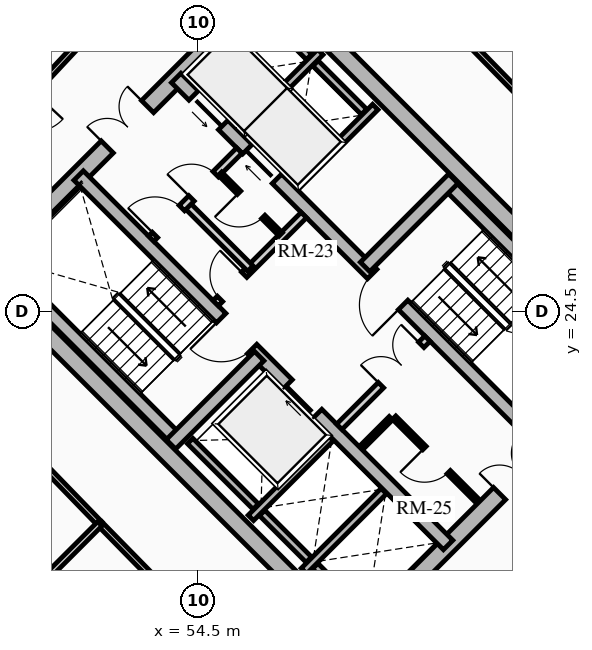
"""IFC4 building model, lengths in metres.
Left out: names, types, materials, properties, quantities, classifications, styles, units other than length and angle.
Written with IfcOpenShell. Run it as: python <this file> out.ifc"""

import sys

from ifc_helpers import new_model, si_unit, direction, frame, frame_2d, origin, place, context, subcontext, project, spatial, rectangle, extrude, source, transform, mapped, element, fill, save


model = new_model("IFC4")
c1 = context("Model", 3, precision=1e-05, world=origin(), true_north=direction((0.0, 1.0)))
c2 = subcontext(c1, "Body", "Model", "MODEL_VIEW")
j1 = project(units=[si_unit("LENGTHUNIT", "METRE"), si_unit("PLANEANGLEUNIT", "RADIAN")], contexts=[c1])
p1 = place(None, origin())
s1 = spatial("IfcSite", under=j1, at=p1, CompositionType="ELEMENT")
p2 = place(p1, origin())
s2 = spatial("IfcBuilding", under=s1, at=p2, CompositionType="ELEMENT")
p3 = place(p2, frame((0.0, 0.0, 84.7)))
s3 = spatial("IfcBuildingStorey", under=s2, at=p3, CompositionType="ELEMENT", Elevation=84.7)
for number, where, z_axis, x_axis in (
    (1, (58.737, 15.697, 0.0), (0.0, 0.0, 1.0), (-0.707, 0.707, 0.0)),
    (2, (66.303, 23.263, 0.0), (0.0, 0.0, 1.0), (-0.707, 0.707, 0.0)),
):
    element("IfcWall", number, at=place(p3, frame(where, z_axis=z_axis, x_axis=x_axis)), inside=s3, PredefinedType="SHEAR", context=c2, shape_type="SweptSolid", body=[
        extrude(rectangle(XDim=14.2, YDim=0.45, at=frame_2d((7.1, 0.0))), origin(), (0.0, 0.0, 1.0), 2.91),
    ])
p4 = place(p3, frame((58.578, 15.856, 0.0), z_axis=(0.0, 0.0, 1.0), x_axis=(0.707106781187, 0.707106781187, 0.0)))
e3 = element("IfcWall", 3, at=p4, inside=s3, PredefinedType="SHEAR", context=c2, shape_type="SweptSolid", body=[
    extrude(rectangle(XDim=10.7, YDim=0.45, at=frame_2d((5.35, 0.0))), origin(), (0.0, 0.0, 1.0), 2.91),
])
m1 = source(origin(), c2, "Body", "SweptSolid", [
    extrude(rectangle(XDim=1.5, YDim=2.02, at=frame_2d((0.75, 1.01))), frame((0.0, 0.235, 0.0), z_axis=(0.0, -1.0, 0.0), x_axis=(1.0, 0.0, 0.0)), (0.0, 0.0, 1.0), 0.47),
])
p5 = place(p4, frame((5.45, 0.0, 0.0)))
e4 = element("IfcOpeningElement", 4, at=p5, cuts=e3, PredefinedType="OPENING", context=c2, shape_type="MappedRepresentation", body=[
    mapped(m1, transform((0.0, 0.0, 0.0), x_axis=(1.0, 0.0, 0.0), y_axis=(0.0, 1.0, 0.0), z_axis=(0.0, 0.0, 1.0), scale=1.0)),
])
p6 = place(p3, frame((48.856, 25.578, 0.0), z_axis=(0.0, 0.0, 1.0), x_axis=(0.707106781187, 0.707106781187, 0.0)))
e5 = element("IfcWall", 5, at=p6, inside=s3, PredefinedType="SHEAR", context=c2, shape_type="SweptSolid", body=[
    extrude(rectangle(XDim=10.7, YDim=0.45, at=frame_2d((5.35, 0.0))), origin(), (0.0, 0.0, 1.0), 2.91),
])
p7 = place(p6, frame((4.6, 0.0, 0.0)))
e6 = element("IfcOpeningElement", 6, at=p7, cuts=e5, PredefinedType="OPENING", context=c2, shape_type="MappedRepresentation", body=[
    mapped(m1, transform((0.0, 0.0, 0.0), x_axis=(1.0, 0.0, 0.0), y_axis=(0.0, 1.0, 0.0), z_axis=(0.0, 0.0, 1.0), scale=1.0)),
])
p8 = place(p3, frame((61.078, 18.355, 0.0), z_axis=(0.0, 0.0, 1.0), x_axis=(-0.707106781187, 0.707106781187, 0.0)))
e7 = element("IfcWall", 7, at=p8, inside=s3, PredefinedType="SHEAR", context=c2, shape_type="SweptSolid", body=[
    extrude(rectangle(XDim=13.75, YDim=0.35, at=frame_2d((6.875, 0.0))), origin(), (0.0, 0.0, 1.0), 2.91),
])
m2 = source(origin(), c2, "Body", "SweptSolid", [
    extrude(rectangle(XDim=1.1, YDim=2.015, at=frame_2d((0.55, 1.007))), frame((0.0, 0.185, 0.0), z_axis=(0.0, -1.0, 0.0), x_axis=(1.0, 0.0, 0.0)), (0.0, 0.0, 1.0), 0.37),
])
p9 = place(p8, frame((4.875, 0.0, 0.0)))
e8 = element("IfcOpeningElement", 8, at=p9, cuts=e7, PredefinedType="OPENING", context=c2, shape_type="MappedRepresentation", body=[
    mapped(m2, transform((0.0, 0.0, 0.0), x_axis=(1.0, 0.0, 0.0), y_axis=(0.0, 1.0, 0.0), z_axis=(0.0, 0.0, 1.0), scale=1.0)),
])
m3 = source(origin(), c2, "Body", "SweptSolid", [
    extrude(rectangle(XDim=1.15, YDim=2.02, at=frame_2d((0.575, 1.01))), frame((0.0, 0.185, 0.0), z_axis=(0.0, -1.0, 0.0), x_axis=(1.0, 0.0, 0.0)), (0.0, 0.0, 1.0), 0.37),
])
p10 = place(p8, frame((7.295, 0.0, 0.0)))
e9 = element("IfcOpeningElement", 9, at=p10, cuts=e7, PredefinedType="OPENING", context=c2, shape_type="MappedRepresentation", body=[
    mapped(m3, transform((0.0, 0.0, 0.0), x_axis=(1.0, 0.0, 0.0), y_axis=(0.0, 1.0, 0.0), z_axis=(0.0, 0.0, 1.0), scale=1.0)),
])
p11 = place(p3, frame((63.645, 20.922, 0.0), z_axis=(0.0, 0.0, 1.0), x_axis=(-0.707106781187, 0.707106781187, 0.0)))
e10 = element("IfcWall", 10, at=p11, inside=s3, PredefinedType="SHEAR", context=c2, shape_type="SweptSolid", body=[
    extrude(rectangle(XDim=13.75, YDim=0.35, at=frame_2d((6.875, 0.0))), origin(), (0.0, 0.0, 1.0), 2.91),
])
p12 = place(p11, frame((10.0, 0.0, 0.0)))
e11 = element("IfcOpeningElement", 11, at=p12, cuts=e10, PredefinedType="OPENING", context=c2, shape_type="MappedRepresentation", body=[
    mapped(m2, transform((0.0, 0.0, 0.0), x_axis=(1.0, 0.0, 0.0), y_axis=(0.0, 1.0, 0.0), z_axis=(0.0, 0.0, 1.0), scale=1.0)),
])
p13 = place(p11, frame((12.0, 0.0, 0.0)))
e12 = element("IfcOpeningElement", 12, at=p13, cuts=e10, PredefinedType="OPENING", context=c2, shape_type="MappedRepresentation", body=[
    mapped(m2, transform((0.0, 0.0, 0.0), x_axis=(1.0, 0.0, 0.0), y_axis=(0.0, 1.0, 0.0), z_axis=(0.0, 0.0, 1.0), scale=1.0)),
])
p14 = place(p11, frame((5.305, 0.0, 0.0)))
e13 = element("IfcOpeningElement", 13, at=p14, cuts=e10, PredefinedType="OPENING", context=c2, shape_type="MappedRepresentation", body=[
    mapped(m3, transform((0.0, 0.0, 0.0), x_axis=(1.0, 0.0, 0.0), y_axis=(0.0, 1.0, 0.0), z_axis=(0.0, 0.0, 1.0), scale=1.0)),
])
p15 = place(p3, frame((53.922, 21.141, 0.0), z_axis=(0.0, 0.0, 1.0), x_axis=(-0.707088616009, 0.707124945897, 0.0)))
e14 = element("IfcWall", 14, at=p15, inside=s3, PredefinedType="SHEAR", context=c2, shape_type="SweptSolid", body=[
    extrude(rectangle(XDim=6.72, YDim=0.35, at=frame_2d((3.36, 0.0))), origin(), (0.0, 0.0, 1.0), 2.91),
])
p16 = place(p3, frame((53.784, 21.003, 0.0), z_axis=(0.0, 0.0, 1.0), x_axis=(0.707106781187, 0.707106781187, 0.0)))
e15 = element("IfcWall", 15, at=p16, inside=s3, PredefinedType="SHEAR", context=c2, shape_type="SweptSolid", body=[
    extrude(rectangle(XDim=3.285, YDim=0.35, at=frame_2d((1.643, 0.0))), origin(), (0.0, 0.0, 1.0), 2.91),
])
p17 = place(p3, frame((65.83, 23.107, 0.0), z_axis=(0.0, 0.0, 1.0), x_axis=(-0.707088616009, 0.707124945897, 0.0)))
e16 = element("IfcWall", 16, at=p17, inside=s3, PredefinedType="SHEAR", context=c2, shape_type="SweptSolid", body=[
    extrude(rectangle(XDim=6.72, YDim=0.35, at=frame_2d((3.36, 0.0))), origin(), (0.0, 0.0, 1.0), 2.91),
])
p18 = place(p3, frame((58.893, 25.674, 0.0), z_axis=(0.0, 0.0, 1.0), x_axis=(0.707106781187, 0.707106781187, 0.0)))
e17 = element("IfcWall", 17, at=p18, inside=s3, PredefinedType="SHEAR", context=c2, shape_type="SweptSolid", body=[
    extrude(rectangle(XDim=3.285, YDim=0.35, at=frame_2d((1.643, 0.0))), origin(), (0.0, 0.0, 1.0), 2.91),
])
p19 = place(p3, frame((55.888, 19.069, 0.0), z_axis=(0.0, 0.0, 1.0), x_axis=(0.707106781187, 0.707106781187, 0.0)))
e18 = element("IfcWall", 18, at=p19, inside=s3, PredefinedType="SHEAR", context=c2, shape_type="SweptSolid", body=[
    extrude(rectangle(XDim=2.97, YDim=0.2, at=frame_2d((1.485, 0.0))), origin(), (0.0, 0.0, 1.0), 2.91),
])
p20 = place(p3, frame((56.015, 19.366, 0.0), z_axis=(0.0, 0.0, 1.0), x_axis=(-0.707106781187, 0.707106781187, 0.0)))
e19 = element("IfcWall", 19, at=p20, inside=s3, PredefinedType="SHEAR", context=c2, shape_type="SweptSolid", body=[
    extrude(rectangle(XDim=2.44, YDim=0.2, at=frame_2d((1.22, 0.0))), origin(), (0.0, 0.0, 1.0), 2.91),
])
p21 = place(p3, frame((57.284, 17.673, 0.0), z_axis=(0.0, 0.0, 1.0), x_axis=(0.707147878904, 0.70706568108, 0.0)))
e20 = element("IfcWall", 20, at=p21, inside=s3, PredefinedType="SHEAR", context=c2, shape_type="SweptSolid", body=[
    extrude(rectangle(XDim=2.97, YDim=0.2, at=frame_2d((1.485, 0.0))), origin(), (0.0, 0.0, 1.0), 2.91),
])
p22 = place(p3, frame((57.412, 17.97, 0.0), z_axis=(0.0, 0.0, 1.0), x_axis=(-0.707106781187, 0.707106781187, 0.0)))
e21 = element("IfcWall", 21, at=p22, inside=s3, PredefinedType="SHEAR", context=c2, shape_type="SweptSolid", body=[
    extrude(rectangle(XDim=1.735, YDim=0.2, at=frame_2d((0.867, 0.0))), origin(), (0.0, 0.0, 1.0), 2.91),
])
p23 = place(p3, frame((58.737, 16.644, 0.0), z_axis=(0.0, 0.0, 1.0), x_axis=(-0.707032117043, 0.707181437447, 0.0)))
e22 = element("IfcWall", 22, at=p23, inside=s3, PredefinedType="SHEAR", context=c2, shape_type="SweptSolid", body=[
    extrude(rectangle(XDim=1.635, YDim=0.2, at=frame_2d((0.817, 0.0))), origin(), (0.0, 0.0, 1.0), 2.91),
])
p24 = place(p3, frame((57.062, 27.781, 0.0), z_axis=(0.0, 0.0, 1.0), x_axis=(0.707106781187, 0.707106781187, 0.0)))
e23 = element("IfcWall", 23, at=p24, inside=s3, PredefinedType="SHEAR", context=c2, shape_type="SweptSolid", body=[
    extrude(rectangle(XDim=2.97, YDim=0.2, at=frame_2d((1.485, 0.0))), origin(), (0.0, 0.0, 1.0), 2.91),
])
p25 = place(p3, frame((55.615, 29.227, 0.0), z_axis=(0.0, 0.0, 1.0), x_axis=(0.707147878904, 0.70706568108, 0.0)))
e24 = element("IfcWall", 24, at=p25, inside=s3, PredefinedType="SHEAR", context=c2, shape_type="SweptSolid", body=[
    extrude(rectangle(XDim=2.97, YDim=0.2, at=frame_2d((1.485, 0.0))), origin(), (0.0, 0.0, 1.0), 2.91),
])
p26 = place(p3, frame((58.865, 29.754, 0.0), z_axis=(0.0, 0.0, 1.0), x_axis=(-0.707174411312, 0.707039144592, 0.0)))
e25 = element("IfcWall", 25, at=p26, inside=s3, PredefinedType="SHEAR", context=c2, shape_type="SweptSolid", body=[
    extrude(rectangle(XDim=1.805, YDim=0.2, at=frame_2d((0.902, 0.0))), origin(), (0.0, 0.0, 1.0), 2.91),
])
p27 = place(p3, frame((57.419, 31.2, 0.0), z_axis=(0.0, 0.0, 1.0), x_axis=(-0.707032117043, 0.707181437447, 0.0)))
e26 = element("IfcWall", 26, at=p27, inside=s3, PredefinedType="SHEAR", context=c2, shape_type="SweptSolid", body=[
    extrude(rectangle(XDim=1.635, YDim=0.2, at=frame_2d((0.817, 0.0))), origin(), (0.0, 0.0, 1.0), 2.91),
])
p28 = place(p3, frame((58.214, 21.467, 0.0), z_axis=(0.0, 0.0, 1.0), x_axis=(0.707106781187, 0.707106781187, 0.0)))
e27 = element("IfcWall", 27, at=p28, inside=s3, PredefinedType="PARTITIONING", context=c2, shape_type="SweptSolid", body=[
    extrude(rectangle(XDim=3.28, YDim=0.2, at=frame_2d((1.64, 0.0))), origin(), (0.0, 0.0, 1.0), 2.655),
])
m4 = source(origin(), c2, "Body", "SweptSolid", [
    extrude(rectangle(XDim=1.5, YDim=2.02, at=frame_2d((0.75, 1.01))), frame((0.0, 0.11, 0.0), z_axis=(0.0, -1.0, 0.0), x_axis=(1.0, 0.0, 0.0)), (0.0, 0.0, 1.0), 0.22),
])
p29 = place(p28, frame((1.55, 0.0, 0.0)))
e28 = element("IfcOpeningElement", 28, at=p29, cuts=e27, PredefinedType="OPENING", context=c2, shape_type="MappedRepresentation", body=[
    mapped(m4, transform((0.0, 0.0, 0.0), x_axis=(1.0, 0.0, 0.0), y_axis=(0.0, 1.0, 0.0), z_axis=(0.0, 0.0, 1.0), scale=1.0)),
])
p30 = place(p3, frame((54.961, 24.719, 0.0), z_axis=(0.0, 0.0, 1.0), x_axis=(0.707106781187, 0.707106781187, 0.0)))
e29 = element("IfcWall", 29, at=p30, inside=s3, PredefinedType="PARTITIONING", context=c2, shape_type="SweptSolid", body=[
    extrude(rectangle(XDim=3.28, YDim=0.2, at=frame_2d((1.64, 0.0))), origin(), (0.0, 0.0, 1.0), 2.655),
])
m5 = source(origin(), c2, "Body", "SweptSolid", [
    extrude(rectangle(XDim=0.9, YDim=2.005, at=frame_2d((0.45, 1.002))), frame((0.0, 0.11, 0.0), z_axis=(0.0, -1.0, 0.0), x_axis=(1.0, 0.0, 0.0)), (0.0, 0.0, 1.0), 0.22),
])
p31 = place(p30, frame((0.16, 0.0, 0.0)))
e30 = element("IfcOpeningElement", 30, at=p31, cuts=e29, PredefinedType="OPENING", context=c2, shape_type="MappedRepresentation", body=[
    mapped(m5, transform((0.0, 0.0, 0.0), x_axis=(1.0, 0.0, 0.0), y_axis=(0.0, 1.0, 0.0), z_axis=(0.0, 0.0, 1.0), scale=1.0)),
])
p32 = place(p3, frame((55.874, 25.631, 0.0), z_axis=(0.0, 0.0, 1.0), x_axis=(-0.707157639372, 0.707055919343, 0.0)))
e31 = element("IfcWall", 31, at=p32, inside=s3, PredefinedType="PARTITIONING", context=c2, shape_type="SweptSolid", body=[
    extrude(rectangle(XDim=2.4, YDim=0.2, at=frame_2d((1.2, 0.0))), origin(), (0.0, 0.0, 1.0), 2.655),
])
p33 = place(p3, frame((53.264, 26.416, 0.0), z_axis=(0.0, 0.0, 1.0), x_axis=(0.707106781187, 0.707106781187, 0.0)))
e32 = element("IfcWall", 32, at=p33, inside=s3, PredefinedType="PARTITIONING", context=c2, shape_type="SweptSolid", body=[
    extrude(rectangle(XDim=3.28, YDim=0.2, at=frame_2d((1.64, 0.0))), origin(), (0.0, 0.0, 1.0), 2.655),
])
m6 = source(origin(), c2, "Body", "SweptSolid", [
    extrude(rectangle(XDim=1.0, YDim=2.015, at=frame_2d((0.5, 1.007))), frame((0.0, 0.11, 0.0), z_axis=(0.0, -1.0, 0.0), x_axis=(1.0, 0.0, 0.0)), (0.0, 0.0, 1.0), 0.22),
])
p34 = place(p33, frame((0.14, 0.0, 0.0)))
e33 = element("IfcOpeningElement", 33, at=p34, cuts=e32, PredefinedType="OPENING", context=c2, shape_type="MappedRepresentation", body=[
    mapped(m6, transform((0.0, 0.0, 0.0), x_axis=(1.0, 0.0, 0.0), y_axis=(0.0, 1.0, 0.0), z_axis=(0.0, 0.0, 1.0), scale=1.0)),
])
p35 = place(p33, frame((1.5, 0.0, 0.0)))
e34 = element("IfcOpeningElement", 34, at=p35, cuts=e32, PredefinedType="OPENING", context=c2, shape_type="MappedRepresentation", body=[
    mapped(m5, transform((0.0, 0.0, 0.0), x_axis=(1.0, 0.0, 0.0), y_axis=(0.0, 1.0, 0.0), z_axis=(0.0, 0.0, 1.0), scale=1.0)),
])
p36 = place(p3, frame((61.835, 19.529, 0.0), z_axis=(0.0, 0.0, 1.0), x_axis=(-0.707146413884, 0.707067146267, 0.0)))
e35 = element("IfcWall", 35, at=p36, inside=s3, PredefinedType="PARTITIONING", context=c2, shape_type="SweptSolid", body=[
    extrude(rectangle(XDim=3.08, YDim=0.125, at=frame_2d((1.54, 0.0))), origin(), (0.0, 0.0, 1.0), 2.655),
])
m7 = source(origin(), c2, "Body", "SweptSolid", [
    extrude(rectangle(XDim=0.9, YDim=2.005, at=frame_2d((0.45, 1.002))), frame((0.0, 0.073, 0.0), z_axis=(0.0, -1.0, 0.0), x_axis=(1.0, 0.0, 0.0)), (0.0, 0.0, 1.0), 0.145),
])
p37 = place(p36, frame((1.05, 0.0, 0.0)))
e36 = element("IfcOpeningElement", 36, at=p37, cuts=e35, PredefinedType="OPENING", context=c2, shape_type="MappedRepresentation", body=[
    mapped(m7, transform((0.0, 0.0, 0.0), x_axis=(1.0, 0.0, 0.0), y_axis=(0.0, 1.0, 0.0), z_axis=(0.0, 0.0, 1.0), scale=1.0)),
])
p38 = place(p3, frame((58.794, 20.915, 0.0), z_axis=(0.0, 0.0, 1.0), x_axis=(0.707106781187, 0.707106781187, 0.0)))
e37 = element("IfcWall", 37, at=p38, inside=s3, PredefinedType="PARTITIONING", context=c2, shape_type="SweptSolid", body=[
    extrude(rectangle(XDim=1.1, YDim=0.125, at=frame_2d((0.55, 0.0))), origin(), (0.0, 0.0, 1.0), 2.655),
])
p39 = place(p3, frame((56.673, 26.529, 0.0), z_axis=(0.0, 0.0, 1.0), x_axis=(-0.707052764397, 0.70716079385, 0.0)))
e38 = element("IfcWall", 38, at=p39, inside=s3, PredefinedType="PARTITIONING", context=c2, shape_type="SweptSolid", body=[
    extrude(rectangle(XDim=2.26, YDim=0.125, at=frame_2d((1.13, 0.0))), origin(), (0.0, 0.0, 1.0), 2.655),
])
p40 = place(p39, frame((0.65, 0.0, 0.0)))
e39 = element("IfcOpeningElement", 39, at=p40, cuts=e38, PredefinedType="OPENING", context=c2, shape_type="MappedRepresentation", body=[
    mapped(m7, transform((0.0, 0.0, 0.0), x_axis=(1.0, 0.0, 0.0), y_axis=(0.0, 1.0, 0.0), z_axis=(0.0, 0.0, 1.0), scale=1.0)),
])
p41 = place(p3, frame((63.086, 30.086, 0.0), z_axis=(0.0, 0.0, 1.0), x_axis=(-0.699075897379, 0.715047473741, 0.0)))
e40 = element("IfcWall", 40, at=p41, inside=s3, PredefinedType="PARTITIONING", context=c2, shape_type="SweptSolid", body=[
    extrude(rectangle(XDim=6.114, YDim=0.15, at=frame_2d((3.057, 0.0))), origin(), (0.0, 0.0, 1.0), 2.225),
])
p42 = place(p3, frame((52.043, 32.28, 0.0), z_axis=(0.0, 0.0, 1.0), x_axis=(-0.682606081633, -0.730786519661, 0.0)))
e41 = element("IfcWall", 41, at=p42, inside=s3, PredefinedType="PARTITIONING", context=c2, shape_type="SweptSolid", body=[
    extrude(rectangle(XDim=6.527, YDim=0.15, at=frame_2d((3.263, 0.0))), origin(), (0.0, 0.0, 1.0), 2.225),
])
m8 = source(origin(), c2, "Body", "SweptSolid", [
    extrude(rectangle(XDim=1.05, YDim=2.015, at=frame_2d((0.525, 1.007))), frame((0.0, 0.085, 0.0), z_axis=(0.0, -1.0, 0.0), x_axis=(1.0, 0.0, 0.0)), (0.0, 0.0, 1.0), 0.17),
])
p43 = place(p42, frame((2.738, 0.0, 0.0)))
e42 = element("IfcOpeningElement", 42, at=p43, cuts=e41, PredefinedType="OPENING", context=c2, shape_type="MappedRepresentation", body=[
    mapped(m8, transform((0.0, 0.0, 0.0), x_axis=(1.0, 0.0, 0.0), y_axis=(0.0, 1.0, 0.0), z_axis=(0.0, 0.0, 1.0), scale=1.0)),
])
p44 = place(p3, frame((47.706, 23.253, 0.0), z_axis=(0.0, 0.0, 1.0), x_axis=(0.696179266346, -0.717867974707, 0.0)))
e43 = element("IfcWall", 43, at=p44, inside=s3, PredefinedType="PARTITIONING", context=c2, shape_type="SweptSolid", body=[
    extrude(rectangle(XDim=6.045, YDim=0.15, at=frame_2d((3.022, 0.0))), origin(), (0.0, 0.0, 1.0), 2.655),
])
p45 = place(p44, frame((2.497, 0.0, 0.0)))
e44 = element("IfcOpeningElement", 44, at=p45, cuts=e43, PredefinedType="OPENING", context=c2, shape_type="MappedRepresentation", body=[
    mapped(m8, transform((0.0, 0.0, 0.0), x_axis=(1.0, 0.0, 0.0), y_axis=(0.0, 1.0, 0.0), z_axis=(0.0, 0.0, 1.0), scale=1.0)),
])
p46 = place(p3, frame((51.914, 18.914, 0.0), z_axis=(0.0, 0.0, 1.0), x_axis=(0.699999313799, -0.714143515465, 0.0)))
e45 = element("IfcWall", 45, at=p46, inside=s3, PredefinedType="PARTITIONING", context=c2, shape_type="SweptSolid", body=[
    extrude(rectangle(XDim=6.162, YDim=0.15, at=frame_2d((3.081, 0.0))), origin(), (0.0, 0.0, 1.0), 2.225),
])
p47 = place(p3, frame((51.914, 18.914, 0.0), z_axis=(0.0, 0.0, 1.0), x_axis=(-0.707106781187, -0.707106781187, 0.0)))
e46 = element("IfcWall", 46, at=p47, inside=s3, PredefinedType="PARTITIONING", context=c2, shape_type="SweptSolid", body=[
    extrude(rectangle(XDim=7.661, YDim=0.16, at=frame_2d((3.831, 0.0))), origin(), (0.0, 0.0, 1.0), 2.179),
])
m9 = source(origin(), c2, "Body", "SweptSolid", [
    extrude(rectangle(XDim=1.1, YDim=2.015, at=frame_2d((0.55, 1.007))), frame((0.0, 0.025, 0.0), z_axis=(0.0, -1.0, 0.0), x_axis=(1.0, 0.0, 0.0)), (0.0, 0.0, 1.0), 0.05),
])
p48 = place(p9, origin())
e47 = element("IfcDoor", 47, at=p48, inside=s3, OperationType="SLIDING_TO_RIGHT", PredefinedType="DOOR", context=c2, shape_type="MappedRepresentation", body=[
    mapped(m9, transform((0.0, 0.0, 0.0), x_axis=(1.0, 0.0, 0.0), y_axis=(0.0, 1.0, 0.0), z_axis=(0.0, 0.0, 1.0), scale=1.0)),
])
fill(e8, e47)
p49 = place(p12, origin())
e48 = element("IfcDoor", 48, at=p49, inside=s3, OperationType="SLIDING_TO_RIGHT", PredefinedType="DOOR", context=c2, shape_type="MappedRepresentation", body=[
    mapped(m9, transform((0.0, 0.0, 0.0), x_axis=(1.0, 0.0, 0.0), y_axis=(0.0, 1.0, 0.0), z_axis=(0.0, 0.0, 1.0), scale=1.0)),
])
fill(e11, e48)
p50 = place(p13, origin())
e49 = element("IfcDoor", 49, at=p50, inside=s3, OperationType="SLIDING_TO_LEFT", PredefinedType="DOOR", context=c2, shape_type="MappedRepresentation", body=[
    mapped(m9, transform((0.0, 0.0, 0.0), x_axis=(1.0, 0.0, 0.0), y_axis=(0.0, 1.0, 0.0), z_axis=(0.0, 0.0, 1.0), scale=1.0)),
])
fill(e12, e49)
m10 = source(origin(), c2, "Body", "SweptSolid", [
    extrude(rectangle(XDim=1.15, YDim=2.02, at=frame_2d((0.575, 1.01))), frame((0.0, 0.025, 0.0), z_axis=(0.0, -1.0, 0.0), x_axis=(1.0, 0.0, 0.0)), (0.0, 0.0, 1.0), 0.05),
])
p51 = place(p10, origin())
e50 = element("IfcDoor", 50, at=p51, inside=s3, OperationType="SINGLE_SWING_RIGHT", PredefinedType="DOOR", context=c2, shape_type="MappedRepresentation", body=[
    mapped(m10, transform((0.0, 0.0, 0.0), x_axis=(1.0, 0.0, 0.0), y_axis=(0.0, 1.0, 0.0), z_axis=(0.0, 0.0, 1.0), scale=1.0)),
])
fill(e9, e50)
p52 = place(p14, origin())
e51 = element("IfcDoor", 51, at=p52, inside=s3, OperationType="SINGLE_SWING_LEFT", PredefinedType="DOOR", context=c2, shape_type="MappedRepresentation", body=[
    mapped(m10, transform((0.0, 0.0, 0.0), x_axis=(1.0, 0.0, 0.0), y_axis=(0.0, 1.0, 0.0), z_axis=(0.0, 0.0, 1.0), scale=1.0)),
])
fill(e13, e51)
m11 = source(origin(), c2, "Body", "SweptSolid", [
    extrude(rectangle(XDim=1.5, YDim=2.02, at=frame_2d((0.75, 1.01))), frame((0.0, 0.025, 0.0), z_axis=(0.0, -1.0, 0.0), x_axis=(1.0, 0.0, 0.0)), (0.0, 0.0, 1.0), 0.05),
])
p53 = place(p7, origin())
e52 = element("IfcDoor", 52, at=p53, inside=s3, OperationType="DOUBLE_DOOR_SINGLE_SWING", PredefinedType="DOOR", context=c2, shape_type="MappedRepresentation", body=[
    mapped(m11, transform((0.0, 0.0, 0.0), x_axis=(1.0, 0.0, 0.0), y_axis=(0.0, 1.0, 0.0), z_axis=(0.0, 0.0, 1.0), scale=1.0)),
])
fill(e6, e52)
p54 = place(p5, origin())
e53 = element("IfcDoor", 53, at=p54, inside=s3, OperationType="DOUBLE_DOOR_SINGLE_SWING", PredefinedType="DOOR", context=c2, shape_type="MappedRepresentation", body=[
    mapped(m11, transform((0.0, 0.0, 0.0), x_axis=(1.0, 0.0, 0.0), y_axis=(0.0, 1.0, 0.0), z_axis=(0.0, 0.0, 1.0), scale=1.0)),
])
fill(e4, e53)
p55 = place(p29, origin())
e54 = element("IfcDoor", 54, at=p55, inside=s3, OperationType="DOUBLE_DOOR_SINGLE_SWING", PredefinedType="DOOR", context=c2, shape_type="MappedRepresentation", body=[
    mapped(m11, transform((0.0, 0.0, 0.0), x_axis=(1.0, 0.0, 0.0), y_axis=(0.0, 1.0, 0.0), z_axis=(0.0, 0.0, 1.0), scale=1.0)),
])
fill(e28, e54)
m12 = source(origin(), c2, "Body", "SweptSolid", [
    extrude(rectangle(XDim=0.9, YDim=2.005, at=frame_2d((0.45, 1.002))), frame((0.0, 0.025, 0.0), z_axis=(0.0, -1.0, 0.0), x_axis=(1.0, 0.0, 0.0)), (0.0, 0.0, 1.0), 0.05),
])
p56 = place(p31, origin())
e55 = element("IfcDoor", 55, at=p56, inside=s3, OperationType="SINGLE_SWING_RIGHT", PredefinedType="DOOR", context=c2, shape_type="MappedRepresentation", body=[
    mapped(m12, transform((0.0, 0.0, 0.0), x_axis=(1.0, 0.0, 0.0), y_axis=(0.0, 1.0, 0.0), z_axis=(0.0, 0.0, 1.0), scale=1.0)),
])
fill(e30, e55)
m13 = source(origin(), c2, "Body", "SweptSolid", [
    extrude(rectangle(XDim=1.0, YDim=2.015, at=frame_2d((0.5, 1.007))), frame((0.0, 0.025, 0.0), z_axis=(0.0, -1.0, 0.0), x_axis=(1.0, 0.0, 0.0)), (0.0, 0.0, 1.0), 0.05),
])
p57 = place(p34, origin())
e56 = element("IfcDoor", 56, at=p57, inside=s3, OperationType="SINGLE_SWING_LEFT", PredefinedType="DOOR", context=c2, shape_type="MappedRepresentation", body=[
    mapped(m13, transform((0.0, 0.0, 0.0), x_axis=(1.0, 0.0, 0.0), y_axis=(0.0, 1.0, 0.0), z_axis=(0.0, 0.0, 1.0), scale=1.0)),
])
fill(e33, e56)
p58 = place(p37, origin())
e57 = element("IfcDoor", 57, at=p58, inside=s3, OperationType="SINGLE_SWING_RIGHT", PredefinedType="DOOR", context=c2, shape_type="MappedRepresentation", body=[
    mapped(m12, transform((0.0, 0.0, 0.0), x_axis=(1.0, 0.0, 0.0), y_axis=(0.0, 1.0, 0.0), z_axis=(0.0, 0.0, 1.0), scale=1.0)),
])
fill(e36, e57)
p59 = place(p35, origin())
e58 = element("IfcDoor", 58, at=p59, inside=s3, OperationType="SINGLE_SWING_LEFT", PredefinedType="DOOR", context=c2, shape_type="MappedRepresentation", body=[
    mapped(m12, transform((0.0, 0.0, 0.0), x_axis=(1.0, 0.0, 0.0), y_axis=(0.0, 1.0, 0.0), z_axis=(0.0, 0.0, 1.0), scale=1.0)),
])
fill(e34, e58)
p60 = place(p40, origin())
e59 = element("IfcDoor", 59, at=p60, inside=s3, OperationType="SINGLE_SWING_RIGHT", PredefinedType="DOOR", context=c2, shape_type="MappedRepresentation", body=[
    mapped(m12, transform((0.0, 0.0, 0.0), x_axis=(1.0, 0.0, 0.0), y_axis=(0.0, 1.0, 0.0), z_axis=(0.0, 0.0, 1.0), scale=1.0)),
])
fill(e39, e59)
save(model, sys.argv[1])
